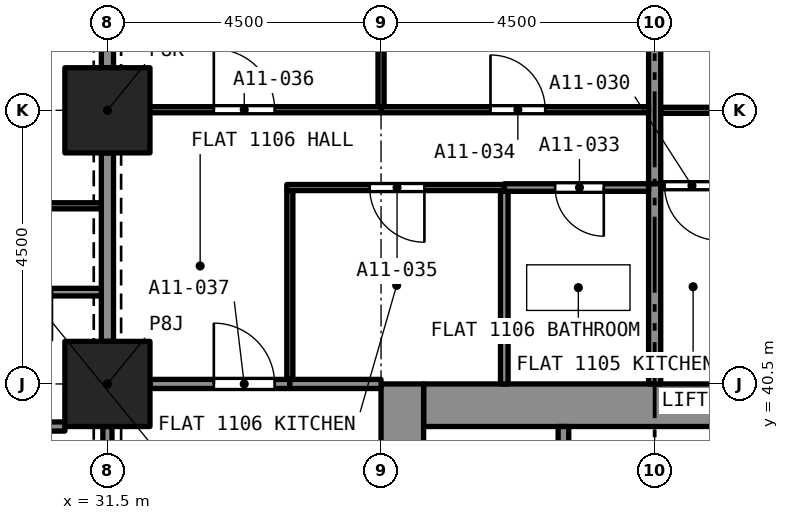
"""IFC4 building model, lengths in metres.
Left out: names, types, materials, properties, quantities, classifications, styles, units other than length and angle.
Written with IfcOpenShell. Run it as: python <this file> out.ifc"""

import sys

from ifc_helpers import new_model, si_unit, direction, frame, frame_2d, origin, origin_2d, place, context, subcontext, project, spatial, rectangle, extrude, element, fill, save


model = new_model("IFC4")
c1 = context("Model", 3, precision=1e-05, world=origin(), true_north=direction((0.0, 1.0)))
c2 = subcontext(c1, "Body", "Model", "MODEL_VIEW")
j1 = project(units=[si_unit("LENGTHUNIT", "METRE"), si_unit("PLANEANGLEUNIT", "RADIAN")], contexts=[c1])
p1 = place(None, origin())
s1 = spatial("IfcSite", under=j1, at=p1, CompositionType="ELEMENT")
p2 = place(p1, origin())
s2 = spatial("IfcBuilding", under=s1, at=p2, CompositionType="ELEMENT")
p3 = place(p2, frame((0.0, 0.0, 46.4)))
s3 = spatial("IfcBuildingStorey", under=s2, at=p3, CompositionType="ELEMENT", Elevation=46.4)
for number, where, z_axis, x_axis in (
    (1, (31.5, 40.5, 0.0), (0.0, 0.0, 1.0), (1.0, 0.0, 0.0)),
    (2, (31.5, 45.0, 0.0), (0.0, 0.0, 1.0), (1.0, 0.0, 0.0)),
):
    element("IfcColumn", number, at=place(p3, frame(where, z_axis=z_axis, x_axis=x_axis)), inside=s3, PredefinedType="COLUMN", context=c2, shape_type="SweptSolid", body=[
        extrude(rectangle(XDim=1.4, YDim=1.4, at=origin_2d()), origin(), (0.0, 0.0, 1.0), 3.2),
    ])
p4 = place(p3, frame((36.7, 40.15, 0.0), z_axis=(0.0, 0.0, 1.0), x_axis=(1.0, 0.0, 0.0)))
e3 = element("IfcWall", 3, at=p4, inside=s3, PredefinedType="SOLIDWALL", context=c2, shape_type="SweptSolid", body=[
    extrude(rectangle(XDim=7.6, YDim=0.7, at=frame_2d((3.8, 0.0))), origin(), (0.0, 0.0, 1.0), 3.2),
])
p5 = place(p3, frame((36.35, 27.0, 0.0), z_axis=(0.0, 0.0, 1.0), x_axis=(0.0, 1.0, 0.0)))
e4 = element("IfcWall", 4, at=p5, inside=s3, PredefinedType="SOLIDWALL", context=c2, shape_type="SweptSolid", body=[
    extrude(rectangle(XDim=13.5, YDim=0.7, at=frame_2d((6.75, 0.0))), origin(), (0.0, 0.0, 1.0), 3.2),
])
p6 = place(p5, frame((8.95, 0.0, 0.0)))
e5 = element("IfcOpeningElement", 5, at=p6, cuts=e4, PredefinedType="OPENING", context=c2, shape_type="SweptSolid", body=[
    extrude(rectangle(XDim=1.2, YDim=2.1, at=frame_2d((0.6, 1.05))), frame((0.0, 0.36, 0.0), z_axis=(0.0, -1.0, 0.0), x_axis=(1.0, 0.0, 0.0)), (0.0, 0.0, 1.0), 0.72),
])
p7 = place(p3, frame((40.6, 45.0, 0.0), z_axis=(0.0, 0.0, 1.0), x_axis=(1.0, 0.0, 0.0)))
e6 = element("IfcWall", 6, at=p7, inside=s3, PredefinedType="PARTITIONING", context=c2, shape_type="SweptSolid", body=[
    extrude(rectangle(XDim=4.4, YDim=0.1, at=frame_2d((2.2, 0.0))), origin(), (0.0, 0.0, 1.0), 2.9),
])
p8 = place(p7, frame((1.7, 0.0, 0.0)))
e7 = element("IfcOpeningElement", 7, at=p8, cuts=e6, PredefinedType="OPENING", context=c2, shape_type="SweptSolid", body=[
    extrude(rectangle(XDim=0.9, YDim=2.1, at=frame_2d((0.45, 1.05))), frame((0.0, 0.06, 0.0), z_axis=(0.0, -1.0, 0.0), x_axis=(1.0, 0.0, 0.0)), (0.0, 0.0, 1.0), 0.12),
])
p9 = place(p3, frame((41.727, 43.76, 0.0), z_axis=(0.0, 0.0, 1.0), x_axis=(-1.0, 0.0, 0.0)))
e8 = element("IfcWall", 8, at=p9, inside=s3, PredefinedType="PARTITIONING", context=c2, shape_type="SweptSolid", body=[
    extrude(rectangle(XDim=1.127, YDim=0.1, at=frame_2d((0.563, 0.0))), origin(), (0.0, 0.0, 1.0), 2.9),
])
p10 = place(p9, frame((0.164, 0.0, 0.0)))
e9 = element("IfcOpeningElement", 9, at=p10, cuts=e8, PredefinedType="OPENING", context=c2, shape_type="SweptSolid", body=[
    extrude(rectangle(XDim=0.9, YDim=2.1, at=frame_2d((0.45, 1.05))), frame((0.0, 0.06, 0.0), z_axis=(0.0, -1.0, 0.0), x_axis=(1.0, 0.0, 0.0)), (0.0, 0.0, 1.0), 0.12),
])
p11 = place(p3, frame((40.5, 43.71, 0.0), z_axis=(0.0, 0.0, 1.0), x_axis=(0.0, 1.0, 0.0)))
e10 = element("IfcWall", 10, at=p11, inside=s3, PredefinedType="PARTITIONING", context=c2, shape_type="SweptSolid", body=[
    extrude(rectangle(XDim=5.09, YDim=0.2, at=frame_2d((2.545, 0.0))), origin(), (0.0, 0.0, 1.0), 2.9),
])
p12 = place(p3, frame((40.5, 40.5, 0.0), z_axis=(0.0, 0.0, 1.0), x_axis=(0.0, 1.0, 0.0)))
e11 = element("IfcWall", 11, at=p12, inside=s3, PredefinedType="PARTITIONING", context=c2, shape_type="SweptSolid", body=[
    extrude(rectangle(XDim=3.292, YDim=0.2, at=frame_2d((1.646, 0.0))), origin(), (0.0, 0.0, 1.0), 2.9),
])
p13 = place(p3, frame((40.4, 43.73, 0.0), z_axis=(0.0, 0.0, 1.0), x_axis=(-1.0, 0.0, 0.0)))
e12 = element("IfcWall", 12, at=p13, inside=s3, PredefinedType="PARTITIONING", context=c2, shape_type="SweptSolid", body=[
    extrude(rectangle(XDim=2.373, YDim=0.125, at=frame_2d((1.187, 0.0))), origin(), (0.0, 0.0, 1.0), 2.9),
])
p14 = place(p13, frame((0.737, 0.0, 0.0)))
e13 = element("IfcOpeningElement", 13, at=p14, cuts=e12, PredefinedType="OPENING", context=c2, shape_type="SweptSolid", body=[
    extrude(rectangle(XDim=0.8, YDim=2.1, at=frame_2d((0.4, 1.05))), frame((0.0, 0.073, 0.0), z_axis=(0.0, -1.0, 0.0), x_axis=(1.0, 0.0, 0.0)), (0.0, 0.0, 1.0), 0.145),
])
p15 = place(p3, frame((38.027, 40.5, 0.0), z_axis=(0.0, 0.0, 1.0), x_axis=(0.0, 1.0, 0.0)))
e14 = element("IfcWall", 14, at=p15, inside=s3, PredefinedType="PARTITIONING", context=c2, shape_type="SweptSolid", body=[
    extrude(rectangle(XDim=3.167, YDim=0.125, at=frame_2d((1.584, 0.0))), origin(), (0.0, 0.0, 1.0), 2.9),
])
p16 = place(p3, frame((36.0, 45.01, 0.0), z_axis=(0.0, 0.0, 1.0), x_axis=(1.0, 0.0, 0.0)))
e15 = element("IfcWall", 15, at=p16, inside=s3, PredefinedType="PARTITIONING", context=c2, shape_type="SweptSolid", body=[
    extrude(rectangle(XDim=4.4, YDim=0.1, at=frame_2d((2.2, 0.0))), origin(), (0.0, 0.0, 1.0), 2.9),
])
p17 = place(p16, frame((1.8, 0.0, 0.0)))
e16 = element("IfcOpeningElement", 16, at=p17, cuts=e15, PredefinedType="OPENING", context=c2, shape_type="SweptSolid", body=[
    extrude(rectangle(XDim=0.9, YDim=2.1, at=frame_2d((0.45, 1.05))), frame((0.0, 0.06, 0.0), z_axis=(0.0, -1.0, 0.0), x_axis=(1.0, 0.0, 0.0)), (0.0, 0.0, 1.0), 0.12),
])
p18 = place(p3, frame((36.0, 45.06, 0.0), z_axis=(0.0, 0.0, 1.0), x_axis=(0.0, 1.0, 0.0)))
e17 = element("IfcWall", 17, at=p18, inside=s3, PredefinedType="PARTITIONING", context=c2, shape_type="SweptSolid", body=[
    extrude(rectangle(XDim=3.74, YDim=0.1, at=frame_2d((1.87, 0.0))), origin(), (0.0, 0.0, 1.0), 2.9),
])
p19 = place(p3, frame((38.027, 43.73, 0.0), z_axis=(0.0, 0.0, 1.0), x_axis=(-1.0, 0.0, 0.0)))
e18 = element("IfcWall", 18, at=p19, inside=s3, PredefinedType="PARTITIONING", context=c2, shape_type="SweptSolid", body=[
    extrude(rectangle(XDim=3.577, YDim=0.1, at=frame_2d((1.788, 0.0))), origin(), (0.0, 0.0, 1.0), 2.9),
])
p20 = place(p19, frame((1.313, 0.0, 0.0)))
e19 = element("IfcOpeningElement", 19, at=p20, cuts=e18, PredefinedType="OPENING", context=c2, shape_type="SweptSolid", body=[
    extrude(rectangle(XDim=0.9, YDim=2.1, at=frame_2d((0.45, 1.05))), frame((0.0, 0.06, 0.0), z_axis=(0.0, -1.0, 0.0), x_axis=(1.0, 0.0, 0.0)), (0.0, 0.0, 1.0), 0.12),
])
p21 = place(p3, frame((34.5, 40.575, 0.0), z_axis=(0.0, 0.0, 1.0), x_axis=(0.0, 1.0, 0.0)))
e20 = element("IfcWall", 20, at=p21, inside=s3, PredefinedType="PARTITIONING", context=c2, shape_type="SweptSolid", body=[
    extrude(rectangle(XDim=3.105, YDim=0.1, at=frame_2d((1.552, 0.0))), origin(), (0.0, 0.0, 1.0), 2.9),
])
p22 = place(p3, frame((32.2, 45.01, 0.0), z_axis=(0.0, 0.0, 1.0), x_axis=(1.0, 0.0, 0.0)))
e21 = element("IfcWall", 21, at=p22, inside=s3, PredefinedType="PARTITIONING", context=c2, shape_type="SweptSolid", body=[
    extrude(rectangle(XDim=3.8, YDim=0.1, at=frame_2d((1.9, 0.0))), origin(), (0.0, 0.0, 1.0), 2.9),
])
p23 = place(p22, frame((1.05, 0.0, 0.0)))
e22 = element("IfcOpeningElement", 22, at=p23, cuts=e21, PredefinedType="OPENING", context=c2, shape_type="SweptSolid", body=[
    extrude(rectangle(XDim=1.0, YDim=2.1, at=frame_2d((0.5, 1.05))), frame((0.0, 0.06, 0.0), z_axis=(0.0, -1.0, 0.0), x_axis=(1.0, 0.0, 0.0)), (0.0, 0.0, 1.0), 0.12),
])
p24 = place(p3, frame((31.5, 41.2, 0.0), z_axis=(0.0, 0.0, 1.0), x_axis=(0.0, 1.0, 0.0)))
e23 = element("IfcWall", 23, at=p24, inside=s3, PredefinedType="PARTITIONING", context=c2, shape_type="SweptSolid", body=[
    extrude(rectangle(XDim=3.1, YDim=0.2, at=frame_2d((1.55, 0.0))), origin(), (0.0, 0.0, 1.0), 2.38),
])
p25 = place(p3, frame((32.2, 40.5, 0.0), z_axis=(0.0, 0.0, 1.0), x_axis=(1.0, 0.0, 0.0)))
e24 = element("IfcWall", 24, at=p25, inside=s3, PredefinedType="PARTITIONING", context=c2, shape_type="SweptSolid", body=[
    extrude(rectangle(XDim=2.3, YDim=0.15, at=frame_2d((1.15, 0.0))), origin(), (0.0, 0.0, 1.0), 2.9),
])
p26 = place(p25, frame((1.05, 0.0, 0.0)))
e25 = element("IfcOpeningElement", 25, at=p26, cuts=e24, PredefinedType="OPENING", context=c2, shape_type="SweptSolid", body=[
    extrude(rectangle(XDim=1.0, YDim=2.1, at=frame_2d((0.5, 1.05))), frame((0.0, 0.085, 0.0), z_axis=(0.0, -1.0, 0.0), x_axis=(1.0, 0.0, 0.0)), (0.0, 0.0, 1.0), 0.17),
])
p27 = place(p3, frame((34.5, 40.5, 0.0), z_axis=(0.0, 0.0, 1.0), x_axis=(1.0, 0.0, 0.0)))
e26 = element("IfcWall", 26, at=p27, inside=s3, PredefinedType="PARTITIONING", context=c2, shape_type="SweptSolid", body=[
    extrude(rectangle(XDim=1.5, YDim=0.15, at=frame_2d((0.75, 0.0))), origin(), (0.0, 0.0, 1.0), 2.9),
])
p28 = place(p3, frame((31.5, 45.7, 0.0), z_axis=(0.0, 0.0, 1.0), x_axis=(0.0, 1.0, 0.0)))
e27 = element("IfcWall", 27, at=p28, inside=s3, PredefinedType="PARTITIONING", context=c2, shape_type="SweptSolid", body=[
    extrude(rectangle(XDim=3.1, YDim=0.2, at=frame_2d((1.55, 0.0))), origin(), (0.0, 0.0, 1.0), 2.38),
])
p29 = place(p3, frame((31.4, 42.01, 0.0), z_axis=(0.0, 0.0, 1.0), x_axis=(-1.0, 0.0, 0.0)))
e28 = element("IfcWall", 28, at=p29, inside=s3, PredefinedType="PARTITIONING", context=c2, shape_type="SweptSolid", body=[
    extrude(rectangle(XDim=2.587, YDim=0.125, at=frame_2d((1.294, 0.0))), origin(), (0.0, 0.0, 1.0), 2.75),
])
p30 = place(p29, frame((0.812, 0.0, 0.0)))
e29 = element("IfcOpeningElement", 29, at=p30, cuts=e28, PredefinedType="OPENING", context=c2, shape_type="SweptSolid", body=[
    extrude(rectangle(XDim=0.8, YDim=2.1, at=frame_2d((0.4, 1.05))), frame((0.0, 0.073, 0.0), z_axis=(0.0, -1.0, 0.0), x_axis=(1.0, 0.0, 0.0)), (0.0, 0.0, 1.0), 0.145),
])
p31 = place(p3, frame((28.875, 39.8, 0.0), z_axis=(0.0, 0.0, 1.0), x_axis=(1.0, 0.0, 0.0)))
e30 = element("IfcWall", 30, at=p31, inside=s3, PredefinedType="PARTITIONING", context=c2, shape_type="SweptSolid", body=[
    extrude(rectangle(XDim=1.925, YDim=0.15, at=frame_2d((0.962, 0.0))), origin(), (0.0, 0.0, 1.0), 2.75),
])
p32 = place(p3, frame((27.0, 43.43, 0.0), z_axis=(0.0, 0.0, 1.0), x_axis=(1.0, 0.0, 0.0)))
e31 = element("IfcWall", 31, at=p32, inside=s3, PredefinedType="PARTITIONING", context=c2, shape_type="SweptSolid", body=[
    extrude(rectangle(XDim=4.4, YDim=0.1, at=frame_2d((2.2, 0.0))), origin(), (0.0, 0.0, 1.0), 2.75),
])
p33 = place(p32, frame((1.8, 0.0, 0.0)))
e32 = element("IfcOpeningElement", 32, at=p33, cuts=e31, PredefinedType="OPENING", context=c2, shape_type="SweptSolid", body=[
    extrude(rectangle(XDim=0.9, YDim=2.1, at=frame_2d((0.45, 1.05))), frame((0.0, 0.06, 0.0), z_axis=(0.0, -1.0, 0.0), x_axis=(1.0, 0.0, 0.0)), (0.0, 0.0, 1.0), 0.12),
])
p34 = place(p3, frame((31.5, 36.7, 0.0), z_axis=(0.0, 0.0, 1.0), x_axis=(0.0, 1.0, 0.0)))
e33 = element("IfcWall", 33, at=p34, inside=s3, PredefinedType="PARTITIONING", context=c2, shape_type="SweptSolid", body=[
    extrude(rectangle(XDim=3.1, YDim=0.15, at=frame_2d((1.55, 0.0))), origin(), (0.0, 0.0, 1.0), 2.38),
])
p35 = place(p34, frame((0.95, 0.0, 0.0)))
e34 = element("IfcOpeningElement", 34, at=p35, cuts=e33, PredefinedType="OPENING", context=c2, shape_type="SweptSolid", body=[
    extrude(rectangle(XDim=1.2, YDim=2.1, at=frame_2d((0.6, 1.05))), frame((0.0, 0.085, 0.0), z_axis=(0.0, -1.0, 0.0), x_axis=(1.0, 0.0, 0.0)), (0.0, 0.0, 1.0), 0.17),
])
p36 = place(p3, frame((39.0, 37.5, 0.0), z_axis=(0.0, 0.0, 1.0), x_axis=(0.0, 1.0, 0.0)))
e35 = element("IfcWall", 35, at=p36, inside=s3, PredefinedType="SOLIDWALL", context=c2, shape_type="SweptSolid", body=[
    extrude(rectangle(XDim=2.3, YDim=0.175, at=frame_2d((1.15, 0.0))), origin(), (0.0, 0.0, 1.0), 2.9),
])
p37 = place(p10, origin())
e36 = element("IfcDoor", 36, at=p37, inside=s3, OperationType="SINGLE_SWING_RIGHT", PredefinedType="DOOR", context=c2, shape_type="SweptSolid", body=[
    extrude(rectangle(XDim=0.9, YDim=2.1, at=frame_2d((0.45, 1.05))), frame((0.0, 0.025, 0.0), z_axis=(0.0, -1.0, 0.0), x_axis=(1.0, 0.0, 0.0)), (0.0, 0.0, 1.0), 0.05),
])
fill(e9, e36)
p38 = place(p14, origin())
e37 = element("IfcDoor", 37, at=p38, inside=s3, OperationType="SINGLE_SWING_LEFT", PredefinedType="DOOR", context=c2, shape_type="SweptSolid", body=[
    extrude(rectangle(XDim=0.8, YDim=2.1, at=frame_2d((0.4, 1.05))), frame((0.0, 0.025, 0.0), z_axis=(0.0, -1.0, 0.0), x_axis=(1.0, 0.0, 0.0)), (0.0, 0.0, 1.0), 0.05),
])
fill(e13, e37)
p39 = place(p17, origin())
e38 = element("IfcDoor", 38, at=p39, inside=s3, OperationType="SINGLE_SWING_RIGHT", PredefinedType="DOOR", context=c2, shape_type="SweptSolid", body=[
    extrude(rectangle(XDim=0.9, YDim=2.1, at=frame_2d((0.45, 1.05))), frame((0.0, 0.025, 0.0), z_axis=(0.0, -1.0, 0.0), x_axis=(1.0, 0.0, 0.0)), (0.0, 0.0, 1.0), 0.05),
])
fill(e16, e38)
p40 = place(p20, origin())
e39 = element("IfcDoor", 39, at=p40, inside=s3, OperationType="SINGLE_SWING_LEFT", PredefinedType="DOOR", context=c2, shape_type="SweptSolid", body=[
    extrude(rectangle(XDim=0.9, YDim=2.1, at=frame_2d((0.45, 1.05))), frame((0.0, 0.025, 0.0), z_axis=(0.0, -1.0, 0.0), x_axis=(1.0, 0.0, 0.0)), (0.0, 0.0, 1.0), 0.05),
])
fill(e19, e39)
p41 = place(p23, origin())
e40 = element("IfcDoor", 40, at=p41, inside=s3, OperationType="SINGLE_SWING_LEFT", PredefinedType="DOOR", context=c2, shape_type="SweptSolid", body=[
    extrude(rectangle(XDim=1.0, YDim=2.1, at=frame_2d((0.5, 1.05))), frame((0.0, 0.025, 0.0), z_axis=(0.0, -1.0, 0.0), x_axis=(1.0, 0.0, 0.0)), (0.0, 0.0, 1.0), 0.05),
])
fill(e22, e40)
p42 = place(p26, origin())
e41 = element("IfcDoor", 41, at=p42, inside=s3, OperationType="SINGLE_SWING_RIGHT", PredefinedType="DOOR", context=c2, shape_type="SweptSolid", body=[
    extrude(rectangle(XDim=1.0, YDim=2.1, at=frame_2d((0.5, 1.05))), frame((0.0, 0.025, 0.0), z_axis=(0.0, -1.0, 0.0), x_axis=(1.0, 0.0, 0.0)), (0.0, 0.0, 1.0), 0.05),
])
fill(e25, e41)
save(model, sys.argv[1])
